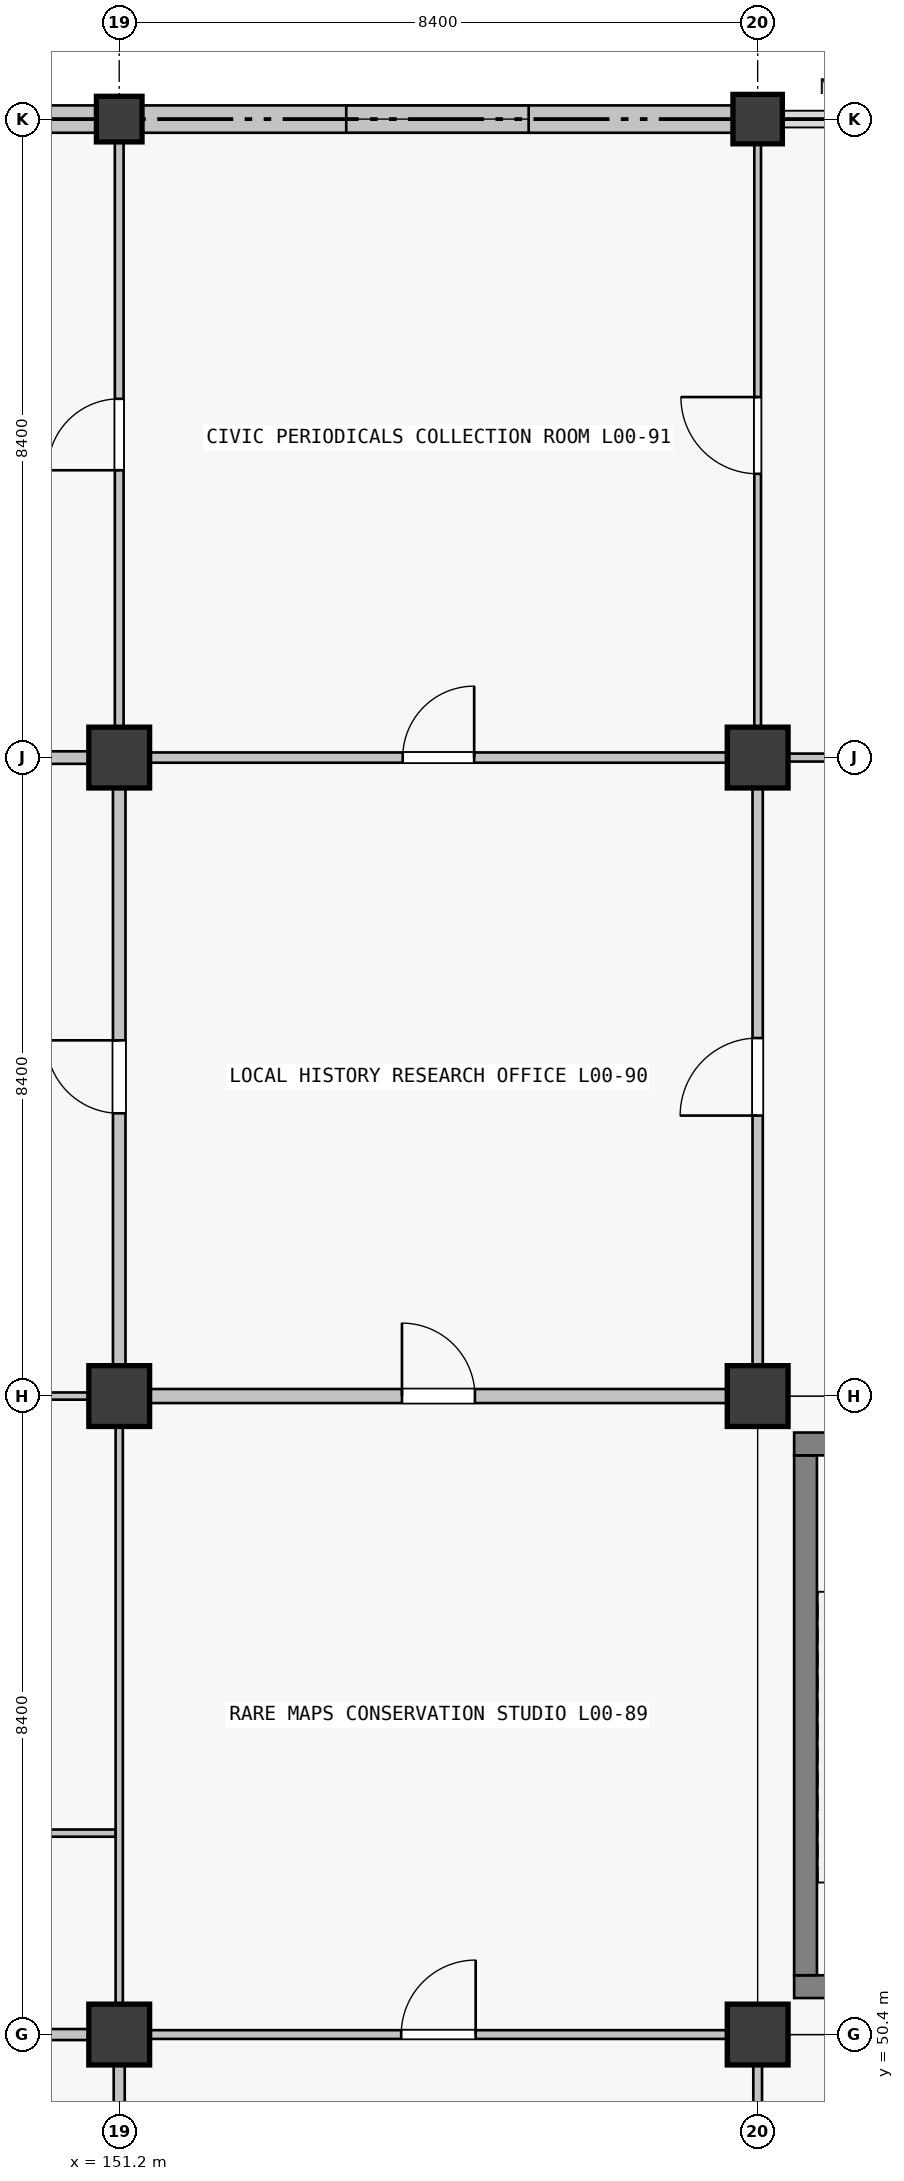
"""IFC4 building model, lengths in metres.
Left out: names, types, materials, properties, quantities, classifications, styles, units other than length and angle.
Written with IfcOpenShell. Run it as: python <this file> out.ifc"""

import sys

from ifc_helpers import new_model, si_unit, direction, frame, frame_2d, origin, origin_2d, place, context, subcontext, project, spatial, rectangle, extrude, element, fill, save


model = new_model("IFC4")
c1 = context("Model", 3, precision=1e-05, world=origin(), true_north=direction((0.0, 1.0)))
c2 = subcontext(c1, "Body", "Model", "MODEL_VIEW")
j1 = project(units=[si_unit("LENGTHUNIT", "METRE"), si_unit("PLANEANGLEUNIT", "RADIAN")], contexts=[c1])
p1 = place(None, origin())
s1 = spatial("IfcSite", under=j1, at=p1, CompositionType="ELEMENT")
p2 = place(p1, origin())
s2 = spatial("IfcBuilding", under=s1, at=p2, CompositionType="ELEMENT")
p3 = place(p2, origin())
s3 = spatial("IfcBuildingStorey", under=s2, at=p3, CompositionType="ELEMENT", Elevation=0.0)
for number, where, z_axis, x_axis in (
    (1, (151.2, 50.4, 0.0), (0.0, 0.0, 1.0), (1.0, 0.0, 0.0)),
    (2, (151.2, 58.8, 0.0), (0.0, 0.0, 1.0), (1.0, 0.0, 0.0)),
    (3, (151.2, 67.2, 0.0), (0.0, 0.0, 1.0), (1.0, 0.0, 0.0)),
):
    element("IfcColumn", number, at=place(p3, frame(where, z_axis=z_axis, x_axis=x_axis)), inside=s3, PredefinedType="COLUMN", context=c2, shape_type="SweptSolid", body=[
        extrude(rectangle(XDim=0.8, YDim=0.8, at=origin_2d()), origin(), (0.0, 0.0, 1.0), 5.76),
    ])
p4 = place(p3, frame((151.2, 75.6, 0.0), z_axis=(0.0, 0.0, 1.0), x_axis=(1.0, 0.0, 0.0)))
e4 = element("IfcColumn", 4, at=p4, inside=s3, PredefinedType="COLUMN", context=c2, shape_type="SweptSolid", body=[
    extrude(rectangle(XDim=0.6, YDim=0.6, at=origin_2d()), origin(), (0.0, 0.0, 1.0), 5.76),
])
for number, where, z_axis, x_axis in (
    (5, (159.6, 50.4, 0.0), (0.0, 0.0, 1.0), (1.0, 0.0, 0.0)),
    (6, (159.6, 58.8, 0.0), (0.0, 0.0, 1.0), (1.0, 0.0, 0.0)),
    (7, (159.6, 67.2, 0.0), (0.0, 0.0, 1.0), (1.0, 0.0, 0.0)),
):
    element("IfcColumn", number, at=place(p3, frame(where, z_axis=z_axis, x_axis=x_axis)), inside=s3, PredefinedType="COLUMN", context=c2, shape_type="SweptSolid", body=[
        extrude(rectangle(XDim=0.8, YDim=0.8, at=origin_2d()), origin(), (0.0, 0.0, 1.0), 5.76),
    ])
p5 = place(p3, frame((159.6, 75.6, 0.0), z_axis=(0.0, 0.0, 1.0), x_axis=(1.0, 0.0, 0.0)))
e8 = element("IfcColumn", 8, at=p5, inside=s3, PredefinedType="COLUMN", context=c2, shape_type="SweptSolid", body=[
    extrude(rectangle(XDim=0.65, YDim=0.65, at=origin_2d()), origin(), (0.0, 0.0, 1.0), 5.76),
])
p6 = place(p3, frame((143.126, 75.6, 0.0), z_axis=(0.0, 0.0, 1.0), x_axis=(1.0, 0.0, 0.0)))
e9 = element("IfcWall", 9, at=p6, inside=s3, PredefinedType="SOLIDWALL", context=c2, shape_type="SweptSolid", body=[
    extrude(rectangle(XDim=7.773, YDim=0.36, at=frame_2d((3.886, 0.0))), origin(), (0.0, 0.0, 1.0), 4.7),
])
p7 = place(p6, frame((2.837, 0.0, 0.9)))
e10 = element("IfcOpeningElement", 10, at=p7, cuts=e9, PredefinedType="OPENING", context=c2, shape_type="SweptSolid", body=[
    extrude(rectangle(XDim=2.1, YDim=1.8, at=frame_2d((1.05, 0.9))), frame((0.0, 0.18, 0.0), z_axis=(0.0, -1.0, 0.0), x_axis=(1.0, 0.0, 0.0)), (0.0, 0.0, 1.0), 0.36),
])
p8 = place(p3, frame((151.501, 75.6, 0.0), z_axis=(0.0, 0.0, 1.0), x_axis=(1.0, 0.0, 0.0)))
e11 = element("IfcWall", 11, at=p8, inside=s3, PredefinedType="SOLIDWALL", context=c2, shape_type="SweptSolid", body=[
    extrude(rectangle(XDim=7.773, YDim=0.36, at=frame_2d((3.886, 0.0))), origin(), (0.0, 0.0, 1.0), 4.7),
])
p9 = place(p8, frame((2.686, 0.0, 0.9)))
e12 = element("IfcOpeningElement", 12, at=p9, cuts=e11, PredefinedType="OPENING", context=c2, shape_type="SweptSolid", body=[
    extrude(rectangle(XDim=2.4, YDim=1.8, at=frame_2d((1.2, 0.9))), frame((0.0, 0.18, 0.0), z_axis=(0.0, -1.0, 0.0), x_axis=(1.0, 0.0, 0.0)), (0.0, 0.0, 1.0), 0.36),
])
p10 = place(p3, frame((167.52, 51.03, 0.0), z_axis=(0.0, 0.0, 1.0), x_axis=(-1.0, 0.0, 0.0)))
e13 = element("IfcWall", 13, at=p10, inside=s3, PredefinedType="SHEAR", context=c2, shape_type="SweptSolid", body=[
    extrude(rectangle(XDim=7.44, YDim=0.3, at=frame_2d((3.72, 0.0))), origin(), (0.0, 0.0, 1.0), 5.76),
])
p11 = place(p10, frame((1.28, 0.0, 0.0)))
e14 = element("IfcOpeningElement", 14, at=p11, cuts=e13, PredefinedType="OPENING", context=c2, shape_type="SweptSolid", body=[
    extrude(rectangle(XDim=1.5, YDim=2.15, at=frame_2d((0.75, 1.075))), frame((0.0, 0.15, 0.0), z_axis=(0.0, -1.0, 0.0), x_axis=(1.0, 0.0, 0.0)), (0.0, 0.0, 1.0), 0.3),
])
p12 = place(p3, frame((160.23, 51.18, 0.0), z_axis=(0.0, 0.0, 1.0), x_axis=(0.0, 1.0, 0.0)))
e15 = element("IfcWall", 15, at=p12, inside=s3, PredefinedType="SHEAR", context=c2, shape_type="SweptSolid", body=[
    extrude(rectangle(XDim=6.84, YDim=0.3, at=frame_2d((3.42, 0.0))), origin(), (0.0, 0.0, 1.0), 5.76),
])
p13 = place(p3, frame((160.08, 58.17, 0.0), z_axis=(0.0, 0.0, 1.0), x_axis=(1.0, 0.0, 0.0)))
e16 = element("IfcWall", 16, at=p13, inside=s3, PredefinedType="SHEAR", context=c2, shape_type="SweptSolid", body=[
    extrude(rectangle(XDim=7.44, YDim=0.3, at=frame_2d((3.72, 0.0))), origin(), (0.0, 0.0, 1.0), 5.76),
])
p14 = place(p3, frame((143.202, 50.4, 0.0), z_axis=(0.0, 0.0, 1.0), x_axis=(1.0, 0.0, 0.0)))
e17 = element("IfcWall", 17, at=p14, inside=s3, PredefinedType="PARTITIONING", context=c2, shape_type="SweptSolid", body=[
    extrude(rectangle(XDim=7.596, YDim=0.145, at=frame_2d((3.798, 0.0))), origin(), (0.0, 0.0, 1.0), 3.66),
])
p15 = place(p3, frame((143.202, 58.8, 0.0), z_axis=(0.0, 0.0, 1.0), x_axis=(1.0, 0.0, 0.0)))
e18 = element("IfcWall", 18, at=p15, inside=s3, PredefinedType="PARTITIONING", context=c2, shape_type="SweptSolid", body=[
    extrude(rectangle(XDim=7.596, YDim=0.095, at=frame_2d((3.798, 0.0))), origin(), (0.0, 0.0, 1.0), 3.66),
])
p16 = place(p3, frame((143.202, 67.2, 0.0), z_axis=(0.0, 0.0, 1.0), x_axis=(1.0, 0.0, 0.0)))
e19 = element("IfcWall", 19, at=p16, inside=s3, PredefinedType="PARTITIONING", context=c2, shape_type="SweptSolid", body=[
    extrude(rectangle(XDim=7.596, YDim=0.165, at=frame_2d((3.798, 0.0))), origin(), (0.0, 0.0, 1.0), 3.66),
])
p17 = place(p16, frame((3.278, 0.0, 0.0)))
e20 = element("IfcOpeningElement", 20, at=p17, cuts=e19, PredefinedType="OPENING", context=c2, shape_type="SweptSolid", body=[
    extrude(rectangle(XDim=1.04, YDim=2.2, at=frame_2d((0.52, 1.1))), frame((0.0, 0.083, 0.0), z_axis=(0.0, -1.0, 0.0), x_axis=(1.0, 0.0, 0.0)), (0.0, 0.0, 1.0), 0.165),
])
p18 = place(p3, frame((151.602, 50.4, 0.0), z_axis=(0.0, 0.0, 1.0), x_axis=(1.0, 0.0, 0.0)))
e21 = element("IfcWall", 21, at=p18, inside=s3, PredefinedType="PARTITIONING", context=c2, shape_type="SweptSolid", body=[
    extrude(rectangle(XDim=7.596, YDim=0.115, at=frame_2d((3.798, 0.0))), origin(), (0.0, 0.0, 1.0), 3.66),
])
p19 = place(p18, frame((3.308, 0.0, 0.0)))
e22 = element("IfcOpeningElement", 22, at=p19, cuts=e21, PredefinedType="OPENING", context=c2, shape_type="SweptSolid", body=[
    extrude(rectangle(XDim=0.98, YDim=2.18, at=frame_2d((0.49, 1.09))), frame((0.0, 0.058, 0.0), z_axis=(0.0, -1.0, 0.0), x_axis=(1.0, 0.0, 0.0)), (0.0, 0.0, 1.0), 0.115),
])
p20 = place(p3, frame((151.602, 58.8, 0.0), z_axis=(0.0, 0.0, 1.0), x_axis=(1.0, 0.0, 0.0)))
e23 = element("IfcWall", 23, at=p20, inside=s3, PredefinedType="PARTITIONING", context=c2, shape_type="SweptSolid", body=[
    extrude(rectangle(XDim=7.596, YDim=0.185, at=frame_2d((3.798, 0.0))), origin(), (0.0, 0.0, 1.0), 3.66),
])
p21 = place(p20, frame((3.318, 0.0, 0.0)))
e24 = element("IfcOpeningElement", 24, at=p21, cuts=e23, PredefinedType="OPENING", context=c2, shape_type="SweptSolid", body=[
    extrude(rectangle(XDim=0.96, YDim=2.18, at=frame_2d((0.48, 1.09))), frame((0.0, 0.093, 0.0), z_axis=(0.0, -1.0, 0.0), x_axis=(1.0, 0.0, 0.0)), (0.0, 0.0, 1.0), 0.185),
])
p22 = place(p3, frame((151.602, 67.2, 0.0), z_axis=(0.0, 0.0, 1.0), x_axis=(1.0, 0.0, 0.0)))
e25 = element("IfcWall", 25, at=p22, inside=s3, PredefinedType="PARTITIONING", context=c2, shape_type="SweptSolid", body=[
    extrude(rectangle(XDim=7.596, YDim=0.135, at=frame_2d((3.798, 0.0))), origin(), (0.0, 0.0, 1.0), 3.66),
])
p23 = place(p22, frame((3.328, 0.0, 0.0)))
e26 = element("IfcOpeningElement", 26, at=p23, cuts=e25, PredefinedType="OPENING", context=c2, shape_type="SweptSolid", body=[
    extrude(rectangle(XDim=0.94, YDim=2.15, at=frame_2d((0.47, 1.075))), frame((0.0, 0.067, 0.0), z_axis=(0.0, -1.0, 0.0), x_axis=(1.0, 0.0, 0.0)), (0.0, 0.0, 1.0), 0.135),
])
p24 = place(p3, frame((160.002, 67.2, 0.0), z_axis=(0.0, 0.0, 1.0), x_axis=(1.0, 0.0, 0.0)))
e27 = element("IfcWall", 27, at=p24, inside=s3, PredefinedType="PARTITIONING", context=c2, shape_type="SweptSolid", body=[
    extrude(rectangle(XDim=7.596, YDim=0.105, at=frame_2d((3.798, 0.0))), origin(), (0.0, 0.0, 1.0), 3.66),
])
p25 = place(p24, frame((3.273, 0.0, 0.0)))
e28 = element("IfcOpeningElement", 28, at=p25, cuts=e27, PredefinedType="OPENING", context=c2, shape_type="SweptSolid", body=[
    extrude(rectangle(XDim=1.05, YDim=2.12, at=frame_2d((0.525, 1.06))), frame((0.0, 0.052, 0.0), z_axis=(0.0, -1.0, 0.0), x_axis=(1.0, 0.0, 0.0)), (0.0, 0.0, 1.0), 0.105),
])
p26 = place(p3, frame((151.2, 42.352, 0.0), z_axis=(0.0, 0.0, 1.0), x_axis=(0.0, 1.0, 0.0)))
e29 = element("IfcWall", 29, at=p26, inside=s3, PredefinedType="PARTITIONING", context=c2, shape_type="SweptSolid", body=[
    extrude(rectangle(XDim=7.646, YDim=0.145, at=frame_2d((3.823, 0.0))), origin(), (0.0, 0.0, 1.0), 3.66),
])
p27 = place(p26, frame((3.333, 0.0, 0.0)))
e30 = element("IfcOpeningElement", 30, at=p27, cuts=e29, PredefinedType="OPENING", context=c2, shape_type="SweptSolid", body=[
    extrude(rectangle(XDim=0.98, YDim=2.18, at=frame_2d((0.49, 1.09))), frame((0.0, 0.073, 0.0), z_axis=(0.0, -1.0, 0.0), x_axis=(1.0, 0.0, 0.0)), (0.0, 0.0, 1.0), 0.145),
])
p28 = place(p3, frame((151.2, 50.802, 0.0), z_axis=(0.0, 0.0, 1.0), x_axis=(0.0, 1.0, 0.0)))
e31 = element("IfcWall", 31, at=p28, inside=s3, PredefinedType="PARTITIONING", context=c2, shape_type="SweptSolid", body=[
    extrude(rectangle(XDim=7.596, YDim=0.095, at=frame_2d((3.798, 0.0))), origin(), (0.0, 0.0, 1.0), 3.66),
])
p29 = place(p3, frame((151.2, 59.202, 0.0), z_axis=(0.0, 0.0, 1.0), x_axis=(0.0, 1.0, 0.0)))
e32 = element("IfcWall", 32, at=p29, inside=s3, PredefinedType="PARTITIONING", context=c2, shape_type="SweptSolid", body=[
    extrude(rectangle(XDim=7.596, YDim=0.165, at=frame_2d((3.798, 0.0))), origin(), (0.0, 0.0, 1.0), 3.66),
])
p30 = place(p29, frame((3.318, 0.0, 0.0)))
e33 = element("IfcOpeningElement", 33, at=p30, cuts=e32, PredefinedType="OPENING", context=c2, shape_type="SweptSolid", body=[
    extrude(rectangle(XDim=0.96, YDim=2.18, at=frame_2d((0.48, 1.09))), frame((0.0, 0.083, 0.0), z_axis=(0.0, -1.0, 0.0), x_axis=(1.0, 0.0, 0.0)), (0.0, 0.0, 1.0), 0.165),
])
p31 = place(p3, frame((151.2, 67.602, 0.0), z_axis=(0.0, 0.0, 1.0), x_axis=(0.0, 1.0, 0.0)))
e34 = element("IfcWall", 34, at=p31, inside=s3, PredefinedType="PARTITIONING", context=c2, shape_type="SweptSolid", body=[
    extrude(rectangle(XDim=7.696, YDim=0.115, at=frame_2d((3.848, 0.0))), origin(), (0.0, 0.0, 1.0), 3.66),
])
p32 = place(p31, frame((3.378, 0.0, 0.0)))
e35 = element("IfcOpeningElement", 35, at=p32, cuts=e34, PredefinedType="OPENING", context=c2, shape_type="SweptSolid", body=[
    extrude(rectangle(XDim=0.94, YDim=2.15, at=frame_2d((0.47, 1.075))), frame((0.0, 0.058, 0.0), z_axis=(0.0, -1.0, 0.0), x_axis=(1.0, 0.0, 0.0)), (0.0, 0.0, 1.0), 0.115),
])
p33 = place(p3, frame((159.6, 42.402, 0.0), z_axis=(0.0, 0.0, 1.0), x_axis=(0.0, 1.0, 0.0)))
e36 = element("IfcWall", 36, at=p33, inside=s3, PredefinedType="PARTITIONING", context=c2, shape_type="SweptSolid", body=[
    extrude(rectangle(XDim=7.596, YDim=0.115, at=frame_2d((3.798, 0.0))), origin(), (0.0, 0.0, 1.0), 3.66),
])
p34 = place(p33, frame((3.338, 0.0, 0.0)))
e37 = element("IfcOpeningElement", 37, at=p34, cuts=e36, PredefinedType="OPENING", context=c2, shape_type="SweptSolid", body=[
    extrude(rectangle(XDim=0.92, YDim=2.15, at=frame_2d((0.46, 1.075))), frame((0.0, 0.058, 0.0), z_axis=(0.0, -1.0, 0.0), x_axis=(1.0, 0.0, 0.0)), (0.0, 0.0, 1.0), 0.115),
])
p35 = place(p3, frame((159.6, 59.202, 0.0), z_axis=(0.0, 0.0, 1.0), x_axis=(0.0, 1.0, 0.0)))
e38 = element("IfcWall", 38, at=p35, inside=s3, PredefinedType="PARTITIONING", context=c2, shape_type="SweptSolid", body=[
    extrude(rectangle(XDim=7.596, YDim=0.135, at=frame_2d((3.798, 0.0))), origin(), (0.0, 0.0, 1.0), 3.66),
])
p36 = place(p35, frame((3.288, 0.0, 0.0)))
e39 = element("IfcOpeningElement", 39, at=p36, cuts=e38, PredefinedType="OPENING", context=c2, shape_type="SweptSolid", body=[
    extrude(rectangle(XDim=1.02, YDim=2.2, at=frame_2d((0.51, 1.1))), frame((0.0, 0.067, 0.0), z_axis=(0.0, -1.0, 0.0), x_axis=(1.0, 0.0, 0.0)), (0.0, 0.0, 1.0), 0.135),
])
p37 = place(p3, frame((159.6, 67.602, 0.0), z_axis=(0.0, 0.0, 1.0), x_axis=(0.0, 1.0, 0.0)))
e40 = element("IfcWall", 40, at=p37, inside=s3, PredefinedType="PARTITIONING", context=c2, shape_type="SweptSolid", body=[
    extrude(rectangle(XDim=7.671, YDim=0.088, at=frame_2d((3.835, 0.0))), origin(), (0.0, 0.0, 1.0), 3.66),
])
p38 = place(p37, frame((3.331, 0.0, 0.0)))
e41 = element("IfcOpeningElement", 41, at=p38, cuts=e40, PredefinedType="OPENING", context=c2, shape_type="SweptSolid", body=[
    extrude(rectangle(XDim=1.01, YDim=2.12, at=frame_2d((0.505, 1.06))), frame((0.0, 0.044, 0.0), z_axis=(0.0, -1.0, 0.0), x_axis=(1.0, 0.0, 0.0)), (0.0, 0.0, 1.0), 0.088),
])
p39 = place(p3, frame((142.865, 53.05, 0.0), z_axis=(0.0, 0.0, 1.0), x_axis=(1.0, 0.0, 0.0)))
e42 = element("IfcWall", 42, at=p39, inside=s3, PredefinedType="PARTITIONING", context=c2, shape_type="SweptSolid", body=[
    extrude(rectangle(XDim=8.286, YDim=0.095, at=frame_2d((4.143, 0.0))), origin(), (0.0, 0.0, 1.0), 3.66),
])
p40 = place(p9, origin())
e43 = element("IfcWindow", 43, at=p40, inside=s3, PartitioningType="SINGLE_PANEL", PredefinedType="WINDOW", context=c2, shape_type="SweptSolid", body=[
    extrude(rectangle(XDim=2.4, YDim=1.8, at=frame_2d((1.2, 0.9))), frame((0.0, 0.03, 0.0), z_axis=(0.0, -1.0, 0.0), x_axis=(1.0, 0.0, 0.0)), (0.0, 0.0, 1.0), 0.06),
])
fill(e12, e43)
p41 = place(p19, origin())
e44 = element("IfcDoor", 44, at=p41, inside=s3, OperationType="SINGLE_SWING_RIGHT", PredefinedType="DOOR", context=c2, shape_type="SweptSolid", body=[
    extrude(rectangle(XDim=0.98, YDim=2.18, at=frame_2d((0.49, 1.09))), frame((0.0, 0.025, 0.0), z_axis=(0.0, -1.0, 0.0), x_axis=(1.0, 0.0, 0.0)), (0.0, 0.0, 1.0), 0.05),
])
fill(e22, e44)
p42 = place(p21, origin())
e45 = element("IfcDoor", 45, at=p42, inside=s3, OperationType="SINGLE_SWING_LEFT", PredefinedType="DOOR", context=c2, shape_type="SweptSolid", body=[
    extrude(rectangle(XDim=0.96, YDim=2.18, at=frame_2d((0.48, 1.09))), frame((0.0, 0.025, 0.0), z_axis=(0.0, -1.0, 0.0), x_axis=(1.0, 0.0, 0.0)), (0.0, 0.0, 1.0), 0.05),
])
fill(e24, e45)
p43 = place(p23, origin())
e46 = element("IfcDoor", 46, at=p43, inside=s3, OperationType="SINGLE_SWING_RIGHT", PredefinedType="DOOR", context=c2, shape_type="SweptSolid", body=[
    extrude(rectangle(XDim=0.94, YDim=2.15, at=frame_2d((0.47, 1.075))), frame((0.0, 0.025, 0.0), z_axis=(0.0, -1.0, 0.0), x_axis=(1.0, 0.0, 0.0)), (0.0, 0.0, 1.0), 0.05),
])
fill(e26, e46)
p44 = place(p36, origin())
e47 = element("IfcDoor", 47, at=p44, inside=s3, OperationType="SINGLE_SWING_LEFT", PredefinedType="DOOR", context=c2, shape_type="SweptSolid", body=[
    extrude(rectangle(XDim=1.02, YDim=2.2, at=frame_2d((0.51, 1.1))), frame((0.0, 0.025, 0.0), z_axis=(0.0, -1.0, 0.0), x_axis=(1.0, 0.0, 0.0)), (0.0, 0.0, 1.0), 0.05),
])
fill(e39, e47)
p45 = place(p30, origin())
e48 = element("IfcDoor", 48, at=p45, inside=s3, OperationType="SINGLE_SWING_RIGHT", PredefinedType="DOOR", context=c2, shape_type="SweptSolid", body=[
    extrude(rectangle(XDim=0.96, YDim=2.18, at=frame_2d((0.48, 1.09))), frame((0.0, 0.025, 0.0), z_axis=(0.0, -1.0, 0.0), x_axis=(1.0, 0.0, 0.0)), (0.0, 0.0, 1.0), 0.05),
])
fill(e33, e48)
p46 = place(p32, origin())
e49 = element("IfcDoor", 49, at=p46, inside=s3, OperationType="SINGLE_SWING_LEFT", PredefinedType="DOOR", context=c2, shape_type="SweptSolid", body=[
    extrude(rectangle(XDim=0.94, YDim=2.15, at=frame_2d((0.47, 1.075))), frame((0.0, 0.025, 0.0), z_axis=(0.0, -1.0, 0.0), x_axis=(1.0, 0.0, 0.0)), (0.0, 0.0, 1.0), 0.05),
])
fill(e35, e49)
p47 = place(p38, origin())
e50 = element("IfcDoor", 50, at=p47, inside=s3, OperationType="SINGLE_SWING_RIGHT", PredefinedType="DOOR", context=c2, shape_type="SweptSolid", body=[
    extrude(rectangle(XDim=1.01, YDim=2.12, at=frame_2d((0.505, 1.06))), frame((0.0, 0.025, 0.0), z_axis=(0.0, -1.0, 0.0), x_axis=(1.0, 0.0, 0.0)), (0.0, 0.0, 1.0), 0.05),
])
fill(e41, e50)
save(model, sys.argv[1])
